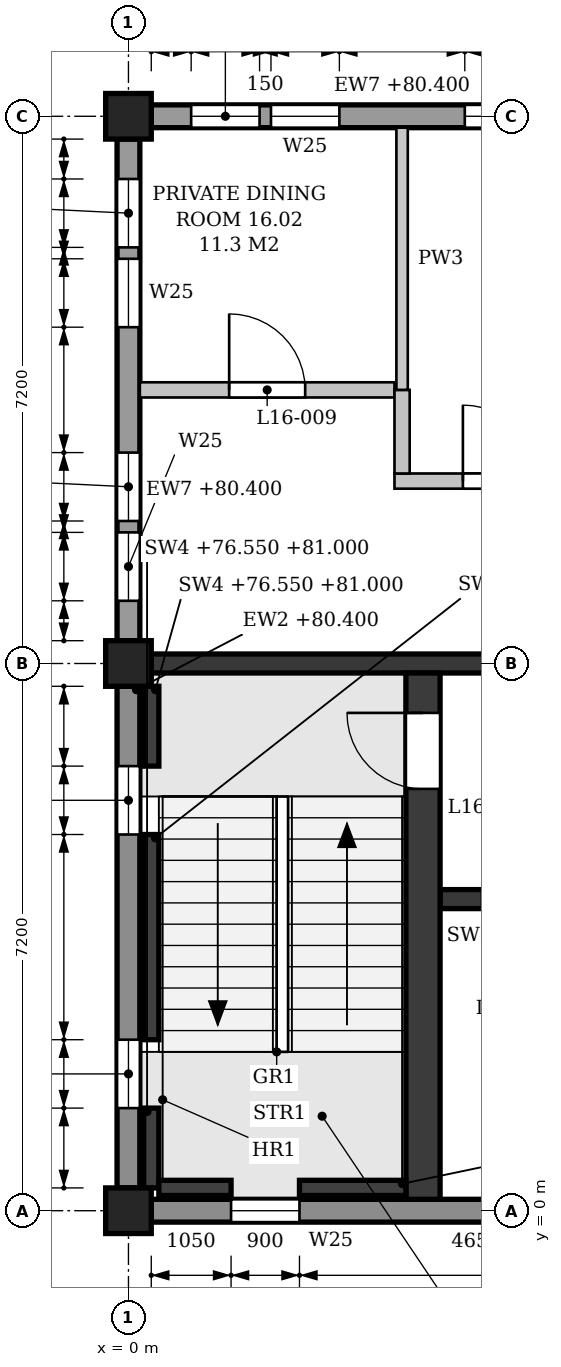
"""IFC4 building model, lengths in metres.
Left out: names, types, materials, properties, quantities, classifications, styles, units other than length and angle.
Written with IfcOpenShell. Run it as: python <this file> out.ifc"""

import sys

from ifc_helpers import new_model, si_unit, direction, frame, frame_2d, origin, origin_2d, place, context, subcontext, project, spatial, polyline, rectangle, outline, extrude, element, fill, save


model = new_model("IFC4")
c1 = context("Model", 3, precision=1e-05, world=origin(), true_north=direction((0.0, 1.0)))
c2 = subcontext(c1, "Body", "Model", "MODEL_VIEW")
j1 = project(units=[si_unit("LENGTHUNIT", "METRE"), si_unit("PLANEANGLEUNIT", "RADIAN")], contexts=[c1])
p1 = place(None, origin())
s1 = spatial("IfcSite", under=j1, at=p1, CompositionType="ELEMENT")
p2 = place(p1, origin())
s2 = spatial("IfcBuilding", under=s1, at=p2, CompositionType="ELEMENT")
p3 = place(p2, frame((0.0, 0.0, 76.8)))
s3 = spatial("IfcBuildingStorey", under=s2, at=p3, CompositionType="ELEMENT", Elevation=76.8)
for number, where, z_axis, x_axis in (
    (1, (0.0, 0.0, 0.0), (0.0, 0.0, 1.0), (1.0, 0.0, 0.0)),
    (2, (0.0, 7.2, 0.0), (0.0, 0.0, 1.0), (1.0, 0.0, 0.0)),
    (3, (0.0, 14.4, 0.0), (0.0, 0.0, 1.0), (1.0, 0.0, 0.0)),
):
    element("IfcColumn", number, at=place(p3, frame(where, z_axis=z_axis, x_axis=x_axis)), inside=s3, PredefinedType="COLUMN", context=c2, shape_type="SweptSolid", body=[
        extrude(rectangle(XDim=0.6, YDim=0.6, at=origin_2d()), origin(), (0.0, 0.0, 1.0), 4.5),
    ])
p4 = place(p3, frame((0.0, 0.3, 0.0), z_axis=(0.0, 0.0, 1.0), x_axis=(0.0, 1.0, 0.0)))
e4 = element("IfcWall", 4, at=p4, inside=s3, PredefinedType="STANDARD", context=c2, shape_type="SweptSolid", body=[
    extrude(rectangle(XDim=6.6, YDim=0.3, at=frame_2d((3.3, 0.0))), origin(), (0.0, 0.0, 1.0), 3.6),
])
p5 = place(p4, frame((1.05, 0.0, 0.9)))
e5 = element("IfcOpeningElement", 5, at=p5, cuts=e4, PredefinedType="OPENING", context=c2, shape_type="SweptSolid", body=[
    extrude(outline(polyline([(0.0, 0.0), (0.9, 0.0), (0.9, 2.15), (0.45, 2.6), (0.0, 2.15), (0.0, 0.0)])), frame((0.0, 0.16, 0.0), z_axis=(0.0, -1.0, 0.0), x_axis=(1.0, 0.0, 0.0)), (0.0, 0.0, 1.0), 0.32),
])
p6 = place(p4, frame((4.65, 0.0, 0.9)))
e6 = element("IfcOpeningElement", 6, at=p6, cuts=e4, PredefinedType="OPENING", context=c2, shape_type="SweptSolid", body=[
    extrude(outline(polyline([(0.0, 0.0), (0.9, 0.0), (0.9, 2.15), (0.45, 2.6), (0.0, 2.15), (0.0, 0.0)])), frame((0.0, 0.16, 0.0), z_axis=(0.0, -1.0, 0.0), x_axis=(1.0, 0.0, 0.0)), (0.0, 0.0, 1.0), 0.32),
])
p7 = place(p3, frame((0.0, 7.5, 0.0), z_axis=(0.0, 0.0, 1.0), x_axis=(0.0, 1.0, 0.0)))
e7 = element("IfcWall", 7, at=p7, inside=s3, PredefinedType="STANDARD", context=c2, shape_type="SweptSolid", body=[
    extrude(rectangle(XDim=6.6, YDim=0.3, at=frame_2d((3.3, 0.0))), origin(), (0.0, 0.0, 1.0), 3.6),
])
p8 = place(p7, frame((0.525, 0.0, 0.9)))
e8 = element("IfcOpeningElement", 8, at=p8, cuts=e7, PredefinedType="OPENING", context=c2, shape_type="SweptSolid", body=[
    extrude(outline(polyline([(0.0, 0.0), (0.9, 0.0), (0.9, 2.15), (0.45, 2.6), (0.0, 2.15), (0.0, 0.0)])), frame((0.0, 0.16, 0.0), z_axis=(0.0, -1.0, 0.0), x_axis=(1.0, 0.0, 0.0)), (0.0, 0.0, 1.0), 0.32),
])
p9 = place(p7, frame((1.575, 0.0, 0.9)))
e9 = element("IfcOpeningElement", 9, at=p9, cuts=e7, PredefinedType="OPENING", context=c2, shape_type="SweptSolid", body=[
    extrude(outline(polyline([(0.0, 0.0), (0.9, 0.0), (0.9, 2.15), (0.45, 2.6), (0.0, 2.15), (0.0, 0.0)])), frame((0.0, 0.16, 0.0), z_axis=(0.0, -1.0, 0.0), x_axis=(1.0, 0.0, 0.0)), (0.0, 0.0, 1.0), 0.32),
])
p10 = place(p7, frame((4.125, 0.0, 0.9)))
e10 = element("IfcOpeningElement", 10, at=p10, cuts=e7, PredefinedType="OPENING", context=c2, shape_type="SweptSolid", body=[
    extrude(outline(polyline([(0.0, 0.0), (0.9, 0.0), (0.9, 2.15), (0.45, 2.6), (0.0, 2.15), (0.0, 0.0)])), frame((0.0, 0.16, 0.0), z_axis=(0.0, -1.0, 0.0), x_axis=(1.0, 0.0, 0.0)), (0.0, 0.0, 1.0), 0.32),
])
p11 = place(p7, frame((5.175, 0.0, 0.9)))
e11 = element("IfcOpeningElement", 11, at=p11, cuts=e7, PredefinedType="OPENING", context=c2, shape_type="SweptSolid", body=[
    extrude(outline(polyline([(0.0, 0.0), (0.9, 0.0), (0.9, 2.15), (0.45, 2.6), (0.0, 2.15), (0.0, 0.0)])), frame((0.0, 0.16, 0.0), z_axis=(0.0, -1.0, 0.0), x_axis=(1.0, 0.0, 0.0)), (0.0, 0.0, 1.0), 0.32),
])
p12 = place(p3, frame((0.3, 0.0, 0.0), z_axis=(0.0, 0.0, 1.0), x_axis=(1.0, 0.0, 0.0)))
e12 = element("IfcWall", 12, at=p12, inside=s3, PredefinedType="STANDARD", context=c2, shape_type="SweptSolid", body=[
    extrude(rectangle(XDim=6.6, YDim=0.3, at=frame_2d((3.3, 0.0))), origin(), (0.0, 0.0, 1.0), 3.6),
])
p13 = place(p12, frame((1.05, 0.0, 0.9)))
e13 = element("IfcOpeningElement", 13, at=p13, cuts=e12, PredefinedType="OPENING", context=c2, shape_type="SweptSolid", body=[
    extrude(outline(polyline([(0.0, 0.0), (0.9, 0.0), (0.9, 2.15), (0.45, 2.6), (0.0, 2.15), (0.0, 0.0)])), frame((0.0, 0.16, 0.0), z_axis=(0.0, -1.0, 0.0), x_axis=(1.0, 0.0, 0.0)), (0.0, 0.0, 1.0), 0.32),
])
p14 = place(p3, frame((6.9, 14.4, 0.0), z_axis=(0.0, 0.0, 1.0), x_axis=(-1.0, 0.0, 0.0)))
e14 = element("IfcWall", 14, at=p14, inside=s3, PredefinedType="STANDARD", context=c2, shape_type="SweptSolid", body=[
    extrude(rectangle(XDim=6.6, YDim=0.3, at=frame_2d((3.3, 0.0))), origin(), (0.0, 0.0, 1.0), 3.6),
])
p15 = place(p14, frame((0.525, 0.0, 0.9)))
e15 = element("IfcOpeningElement", 15, at=p15, cuts=e14, PredefinedType="OPENING", context=c2, shape_type="SweptSolid", body=[
    extrude(outline(polyline([(0.0, 0.0), (0.9, 0.0), (0.9, 2.15), (0.45, 2.6), (0.0, 2.15), (0.0, 0.0)])), frame((0.0, 0.16, 0.0), z_axis=(0.0, -1.0, 0.0), x_axis=(1.0, 0.0, 0.0)), (0.0, 0.0, 1.0), 0.32),
])
p16 = place(p14, frame((1.575, 0.0, 0.9)))
e16 = element("IfcOpeningElement", 16, at=p16, cuts=e14, PredefinedType="OPENING", context=c2, shape_type="SweptSolid", body=[
    extrude(outline(polyline([(0.0, 0.0), (0.9, 0.0), (0.9, 2.15), (0.45, 2.6), (0.0, 2.15), (0.0, 0.0)])), frame((0.0, 0.16, 0.0), z_axis=(0.0, -1.0, 0.0), x_axis=(1.0, 0.0, 0.0)), (0.0, 0.0, 1.0), 0.32),
])
p17 = place(p14, frame((4.125, 0.0, 0.9)))
e17 = element("IfcOpeningElement", 17, at=p17, cuts=e14, PredefinedType="OPENING", context=c2, shape_type="SweptSolid", body=[
    extrude(outline(polyline([(0.0, 0.0), (0.9, 0.0), (0.9, 2.15), (0.45, 2.6), (0.0, 2.15), (0.0, 0.0)])), frame((0.0, 0.16, 0.0), z_axis=(0.0, -1.0, 0.0), x_axis=(1.0, 0.0, 0.0)), (0.0, 0.0, 1.0), 0.32),
])
p18 = place(p14, frame((5.175, 0.0, 0.9)))
e18 = element("IfcOpeningElement", 18, at=p18, cuts=e14, PredefinedType="OPENING", context=c2, shape_type="SweptSolid", body=[
    extrude(outline(polyline([(0.0, 0.0), (0.9, 0.0), (0.9, 2.15), (0.45, 2.6), (0.0, 2.15), (0.0, 0.0)])), frame((0.0, 0.16, 0.0), z_axis=(0.0, -1.0, 0.0), x_axis=(1.0, 0.0, 0.0)), (0.0, 0.0, 1.0), 0.32),
])
p19 = place(p3, frame((0.3, 7.2, 0.0), z_axis=(0.0, 0.0, 1.0), x_axis=(1.0, 0.0, 0.0)))
e19 = element("IfcWall", 19, at=p19, inside=s3, PredefinedType="SHEAR", context=c2, shape_type="SweptSolid", body=[
    extrude(rectangle(XDim=6.6, YDim=0.25, at=frame_2d((3.3, 0.0))), origin(), (0.0, 0.0, 1.0), 3.55),
])
p20 = place(p19, frame((4.95, 0.0, 0.0)))
e20 = element("IfcOpeningElement", 20, at=p20, cuts=e19, PredefinedType="OPENING", context=c2, shape_type="SweptSolid", body=[
    extrude(rectangle(XDim=1.1, YDim=2.1, at=frame_2d((0.55, 1.05))), frame((0.0, 0.135, 0.0), z_axis=(0.0, -1.0, 0.0), x_axis=(1.0, 0.0, 0.0)), (0.0, 0.0, 1.0), 0.27),
])
p21 = place(p3, frame((0.3, 0.3, -0.25), z_axis=(0.0, 0.0, 1.0), x_axis=(0.0, 1.0, 0.0)))
e21 = element("IfcWall", 21, at=p21, inside=s3, PredefinedType="SHEAR", context=c2, shape_type="SweptSolid", body=[
    extrude(rectangle(XDim=1.05, YDim=0.2, at=frame_2d((0.525, 0.0))), origin(), (0.0, 0.0, 1.0), 4.45),
])
p22 = place(p3, frame((0.3, 2.25, -0.25), z_axis=(0.0, 0.0, 1.0), x_axis=(0.0, 1.0, 0.0)))
e22 = element("IfcWall", 22, at=p22, inside=s3, PredefinedType="SHEAR", context=c2, shape_type="SweptSolid", body=[
    extrude(rectangle(XDim=2.7, YDim=0.2, at=frame_2d((1.35, 0.0))), origin(), (0.0, 0.0, 1.0), 4.45),
])
p23 = place(p3, frame((0.3, 5.85, -0.25), z_axis=(0.0, 0.0, 1.0), x_axis=(0.0, 1.0, 0.0)))
e23 = element("IfcWall", 23, at=p23, inside=s3, PredefinedType="SHEAR", context=c2, shape_type="SweptSolid", body=[
    extrude(rectangle(XDim=1.05, YDim=0.2, at=frame_2d((0.525, 0.0))), origin(), (0.0, 0.0, 1.0), 4.45),
])
p24 = place(p3, frame((0.4, 0.3, -0.25), z_axis=(0.0, 0.0, 1.0), x_axis=(1.0, 0.0, 0.0)))
e24 = element("IfcWall", 24, at=p24, inside=s3, PredefinedType="SHEAR", context=c2, shape_type="SweptSolid", body=[
    extrude(rectangle(XDim=0.95, YDim=0.2, at=frame_2d((0.475, 0.0))), origin(), (0.0, 0.0, 1.0), 4.45),
])
p25 = place(p3, frame((2.25, 0.3, -0.25), z_axis=(0.0, 0.0, 1.0), x_axis=(1.0, 0.0, 0.0)))
e25 = element("IfcWall", 25, at=p25, inside=s3, PredefinedType="SHEAR", context=c2, shape_type="SweptSolid", body=[
    extrude(rectangle(XDim=1.4, YDim=0.2, at=frame_2d((0.7, 0.0))), origin(), (0.0, 0.0, 1.0), 4.45),
])
p26 = place(p3, frame((3.875, 0.15, 0.0), z_axis=(0.0, 0.0, 1.0), x_axis=(0.0, 1.0, 0.0)))
e26 = element("IfcWall", 26, at=p26, inside=s3, PredefinedType="SHEAR", context=c2, shape_type="SweptSolid", body=[
    extrude(rectangle(XDim=6.925, YDim=0.45, at=frame_2d((3.462, 0.0))), origin(), (0.0, 0.0, 1.0), 4.2),
])
p27 = place(p26, frame((5.4, 0.0, 0.0)))
e27 = element("IfcOpeningElement", 27, at=p27, cuts=e26, PredefinedType="OPENING", context=c2, shape_type="SweptSolid", body=[
    extrude(rectangle(XDim=1.0, YDim=2.1, at=frame_2d((0.5, 1.05))), frame((0.0, 0.235, 0.0), z_axis=(0.0, -1.0, 0.0), x_axis=(1.0, 0.0, 0.0)), (0.0, 0.0, 1.0), 0.47),
])
p28 = place(p3, frame((4.1, 4.1, 0.0), z_axis=(0.0, 0.0, 1.0), x_axis=(1.0, 0.0, 0.0)))
e28 = element("IfcWall", 28, at=p28, inside=s3, PredefinedType="SHEAR", context=c2, shape_type="SweptSolid", body=[
    extrude(rectangle(XDim=2.975, YDim=0.25, at=frame_2d((1.487, 0.0))), origin(), (0.0, 0.0, 1.0), 4.2),
])
p29 = place(p28, frame((0.55, 0.0, 0.0)))
e29 = element("IfcOpeningElement", 29, at=p29, cuts=e28, PredefinedType="OPENING", context=c2, shape_type="SweptSolid", body=[
    extrude(rectangle(XDim=0.9, YDim=2.1, at=frame_2d((0.45, 1.05))), frame((0.0, 0.135, 0.0), z_axis=(0.0, -1.0, 0.0), x_axis=(1.0, 0.0, 0.0)), (0.0, 0.0, 1.0), 0.27),
])
p30 = place(p3, frame((3.5, 9.6, 0.0), z_axis=(0.0, 0.0, 1.0), x_axis=(1.0, 0.0, 0.0)))
e30 = element("IfcWall", 30, at=p30, inside=s3, PredefinedType="PARTITIONING", context=c2, shape_type="SweptSolid", body=[
    extrude(outline(polyline([(0.0, 0.0), (18.0, 0.0), (18.0, 3.55), (17.875, 3.55), (17.875, 4.2), (11.125, 4.2), (11.125, 3.55), (10.675, 3.55), (10.675, 4.2), (3.925, 4.2), (3.925, 3.55), (3.475, 3.55), (3.475, 4.2), (0.0, 4.2), (0.0, 0.0)])), frame((0.0, 0.1, 0.0), z_axis=(0.0, -1.0, 0.0), x_axis=(1.0, 0.0, 0.0)), (0.0, 0.0, 1.0), 0.2),
])
p31 = place(p30, frame((15.75, 0.0, 0.0)))
e31 = element("IfcOpeningElement", 31, at=p31, cuts=e30, PredefinedType="OPENING", context=c2, shape_type="SweptSolid", body=[
    extrude(rectangle(XDim=1.0, YDim=2.1, at=frame_2d((0.5, 1.05))), frame((0.0, 0.11, 0.0), z_axis=(0.0, -1.0, 0.0), x_axis=(1.0, 0.0, 0.0)), (0.0, 0.0, 1.0), 0.22),
])
p32 = place(p30, frame((0.9, 0.0, 0.0)))
e32 = element("IfcOpeningElement", 32, at=p32, cuts=e30, PredefinedType="OPENING", context=c2, shape_type="SweptSolid", body=[
    extrude(rectangle(XDim=2.0, YDim=2.1, at=frame_2d((1.0, 1.05))), frame((0.0, 0.11, 0.0), z_axis=(0.0, -1.0, 0.0), x_axis=(1.0, 0.0, 0.0)), (0.0, 0.0, 1.0), 0.22),
])
p33 = place(p30, frame((6.3, 0.0, 0.0)))
e33 = element("IfcOpeningElement", 33, at=p33, cuts=e30, PredefinedType="OPENING", context=c2, shape_type="SweptSolid", body=[
    extrude(rectangle(XDim=2.0, YDim=2.1, at=frame_2d((1.0, 1.05))), frame((0.0, 0.11, 0.0), z_axis=(0.0, -1.0, 0.0), x_axis=(1.0, 0.0, 0.0)), (0.0, 0.0, 1.0), 0.22),
])
p34 = place(p30, frame((12.2, 0.0, 0.0)))
e34 = element("IfcOpeningElement", 34, at=p34, cuts=e30, PredefinedType="OPENING", context=c2, shape_type="SweptSolid", body=[
    extrude(rectangle(XDim=1.0, YDim=2.1, at=frame_2d((0.5, 1.05))), frame((0.0, 0.11, 0.0), z_axis=(0.0, -1.0, 0.0), x_axis=(1.0, 0.0, 0.0)), (0.0, 0.0, 1.0), 0.22),
])
p35 = place(p3, frame((0.15, 10.8, 0.0), z_axis=(0.0, 0.0, 1.0), x_axis=(1.0, 0.0, 0.0)))
e35 = element("IfcWall", 35, at=p35, inside=s3, PredefinedType="PARTITIONING", context=c2, shape_type="SweptSolid", body=[
    extrude(outline(polyline([(0.0, 0.0), (3.35, 0.0), (3.35, 4.2), (0.05, 4.2), (0.05, 3.6), (0.0, 3.6), (0.0, 0.0)])), frame((0.0, 0.1, 0.0), z_axis=(0.0, -1.0, 0.0), x_axis=(1.0, 0.0, 0.0)), (0.0, 0.0, 1.0), 0.2),
])
p36 = place(p35, frame((1.175, 0.0, 0.0)))
e36 = element("IfcOpeningElement", 36, at=p36, cuts=e35, PredefinedType="OPENING", context=c2, shape_type="SweptSolid", body=[
    extrude(rectangle(XDim=1.0, YDim=2.1, at=frame_2d((0.5, 1.05))), frame((0.0, 0.11, 0.0), z_axis=(0.0, -1.0, 0.0), x_axis=(1.0, 0.0, 0.0)), (0.0, 0.0, 1.0), 0.22),
])
p37 = place(p3, frame((3.6, 9.7, 0.0), z_axis=(0.0, 0.0, 1.0), x_axis=(0.0, 1.0, 0.0)))
e37 = element("IfcWall", 37, at=p37, inside=s3, PredefinedType="PARTITIONING", context=c2, shape_type="SweptSolid", body=[
    extrude(rectangle(XDim=1.1, YDim=0.2, at=frame_2d((0.55, 0.0))), origin(), (0.0, 0.0, 1.0), 4.2),
])
p38 = place(p3, frame((3.6, 10.8, 0.0), z_axis=(0.0, 0.0, 1.0), x_axis=(0.0, 1.0, 0.0)))
e38 = element("IfcWall", 38, at=p38, inside=s3, PredefinedType="PARTITIONING", context=c2, shape_type="SweptSolid", body=[
    extrude(rectangle(XDim=3.45, YDim=0.15, at=frame_2d((1.725, 0.0))), origin(), (0.0, 0.0, 1.0), 3.55),
])
p39 = place(p16, origin())
e39 = element("IfcWindow", 39, at=p39, inside=s3, PartitioningType="SINGLE_PANEL", PredefinedType="WINDOW", context=c2, shape_type="SweptSolid", body=[
    extrude(outline(polyline([(0.0, 0.0), (0.9, 0.0), (0.9, 2.15), (0.45, 2.6), (0.0, 2.15), (0.0, 0.0)])), frame((0.0, 0.03, 0.0), z_axis=(0.0, -1.0, 0.0), x_axis=(1.0, 0.0, 0.0)), (0.0, 0.0, 1.0), 0.06),
])
fill(e16, e39)
p40 = place(p17, origin())
e40 = element("IfcWindow", 40, at=p40, inside=s3, PartitioningType="SINGLE_PANEL", PredefinedType="WINDOW", context=c2, shape_type="SweptSolid", body=[
    extrude(outline(polyline([(0.0, 0.0), (0.9, 0.0), (0.9, 2.15), (0.45, 2.6), (0.0, 2.15), (0.0, 0.0)])), frame((0.0, 0.03, 0.0), z_axis=(0.0, -1.0, 0.0), x_axis=(1.0, 0.0, 0.0)), (0.0, 0.0, 1.0), 0.06),
])
fill(e17, e40)
p41 = place(p18, origin())
e41 = element("IfcWindow", 41, at=p41, inside=s3, PartitioningType="SINGLE_PANEL", PredefinedType="WINDOW", context=c2, shape_type="SweptSolid", body=[
    extrude(outline(polyline([(0.0, 0.0), (0.9, 0.0), (0.9, 2.15), (0.45, 2.6), (0.0, 2.15), (0.0, 0.0)])), frame((0.0, 0.03, 0.0), z_axis=(0.0, -1.0, 0.0), x_axis=(1.0, 0.0, 0.0)), (0.0, 0.0, 1.0), 0.06),
])
fill(e18, e41)
p42 = place(p13, origin())
e42 = element("IfcWindow", 42, at=p42, inside=s3, PartitioningType="SINGLE_PANEL", PredefinedType="WINDOW", context=c2, shape_type="SweptSolid", body=[
    extrude(outline(polyline([(0.0, 0.0), (0.9, 0.0), (0.9, 2.15), (0.45, 2.6), (0.0, 2.15), (0.0, 0.0)])), frame((0.0, 0.03, 0.0), z_axis=(0.0, -1.0, 0.0), x_axis=(1.0, 0.0, 0.0)), (0.0, 0.0, 1.0), 0.06),
])
fill(e13, e42)
p43 = place(p5, origin())
e43 = element("IfcWindow", 43, at=p43, inside=s3, PartitioningType="SINGLE_PANEL", PredefinedType="WINDOW", context=c2, shape_type="SweptSolid", body=[
    extrude(outline(polyline([(0.0, 0.0), (0.9, 0.0), (0.9, 2.15), (0.45, 2.6), (0.0, 2.15), (0.0, 0.0)])), frame((0.0, 0.03, 0.0), z_axis=(0.0, -1.0, 0.0), x_axis=(1.0, 0.0, 0.0)), (0.0, 0.0, 1.0), 0.06),
])
fill(e5, e43)
p44 = place(p6, origin())
e44 = element("IfcWindow", 44, at=p44, inside=s3, PartitioningType="SINGLE_PANEL", PredefinedType="WINDOW", context=c2, shape_type="SweptSolid", body=[
    extrude(outline(polyline([(0.0, 0.0), (0.9, 0.0), (0.9, 2.15), (0.45, 2.6), (0.0, 2.15), (0.0, 0.0)])), frame((0.0, 0.03, 0.0), z_axis=(0.0, -1.0, 0.0), x_axis=(1.0, 0.0, 0.0)), (0.0, 0.0, 1.0), 0.06),
])
fill(e6, e44)
p45 = place(p8, origin())
e45 = element("IfcWindow", 45, at=p45, inside=s3, PartitioningType="SINGLE_PANEL", PredefinedType="WINDOW", context=c2, shape_type="SweptSolid", body=[
    extrude(outline(polyline([(0.0, 0.0), (0.9, 0.0), (0.9, 2.15), (0.45, 2.6), (0.0, 2.15), (0.0, 0.0)])), frame((0.0, 0.03, 0.0), z_axis=(0.0, -1.0, 0.0), x_axis=(1.0, 0.0, 0.0)), (0.0, 0.0, 1.0), 0.06),
])
fill(e8, e45)
p46 = place(p9, origin())
e46 = element("IfcWindow", 46, at=p46, inside=s3, PartitioningType="SINGLE_PANEL", PredefinedType="WINDOW", context=c2, shape_type="SweptSolid", body=[
    extrude(outline(polyline([(0.0, 0.0), (0.9, 0.0), (0.9, 2.15), (0.45, 2.6), (0.0, 2.15), (0.0, 0.0)])), frame((0.0, 0.03, 0.0), z_axis=(0.0, -1.0, 0.0), x_axis=(1.0, 0.0, 0.0)), (0.0, 0.0, 1.0), 0.06),
])
fill(e9, e46)
p47 = place(p10, origin())
e47 = element("IfcWindow", 47, at=p47, inside=s3, PartitioningType="SINGLE_PANEL", PredefinedType="WINDOW", context=c2, shape_type="SweptSolid", body=[
    extrude(outline(polyline([(0.0, 0.0), (0.9, 0.0), (0.9, 2.15), (0.45, 2.6), (0.0, 2.15), (0.0, 0.0)])), frame((0.0, 0.03, 0.0), z_axis=(0.0, -1.0, 0.0), x_axis=(1.0, 0.0, 0.0)), (0.0, 0.0, 1.0), 0.06),
])
fill(e10, e47)
p48 = place(p11, origin())
e48 = element("IfcWindow", 48, at=p48, inside=s3, PartitioningType="SINGLE_PANEL", PredefinedType="WINDOW", context=c2, shape_type="SweptSolid", body=[
    extrude(outline(polyline([(0.0, 0.0), (0.9, 0.0), (0.9, 2.15), (0.45, 2.6), (0.0, 2.15), (0.0, 0.0)])), frame((0.0, 0.03, 0.0), z_axis=(0.0, -1.0, 0.0), x_axis=(1.0, 0.0, 0.0)), (0.0, 0.0, 1.0), 0.06),
])
fill(e11, e48)
p49 = place(p27, origin())
e49 = element("IfcDoor", 49, at=p49, inside=s3, OperationType="SINGLE_SWING_RIGHT", PredefinedType="DOOR", context=c2, shape_type="SweptSolid", body=[
    extrude(rectangle(XDim=1.0, YDim=2.1, at=frame_2d((0.5, 1.05))), frame((0.0, 0.025, 0.0), z_axis=(0.0, -1.0, 0.0), x_axis=(1.0, 0.0, 0.0)), (0.0, 0.0, 1.0), 0.05),
])
fill(e27, e49)
p50 = place(p36, origin())
e50 = element("IfcDoor", 50, at=p50, inside=s3, OperationType="SINGLE_SWING_LEFT", PredefinedType="DOOR", context=c2, shape_type="SweptSolid", body=[
    extrude(rectangle(XDim=1.0, YDim=2.1, at=frame_2d((0.5, 1.05))), frame((0.0, 0.025, 0.0), z_axis=(0.0, -1.0, 0.0), x_axis=(1.0, 0.0, 0.0)), (0.0, 0.0, 1.0), 0.05),
])
fill(e36, e50)
p51 = place(p32, origin())
e51 = element("IfcDoor", 51, at=p51, inside=s3, OperationType="DOUBLE_DOOR_SINGLE_SWING", PredefinedType="DOOR", context=c2, shape_type="SweptSolid", body=[
    extrude(rectangle(XDim=2.0, YDim=2.1, at=frame_2d((1.0, 1.05))), frame((0.0, 0.025, 0.0), z_axis=(0.0, -1.0, 0.0), x_axis=(1.0, 0.0, 0.0)), (0.0, 0.0, 1.0), 0.05),
])
fill(e32, e51)
save(model, sys.argv[1])
